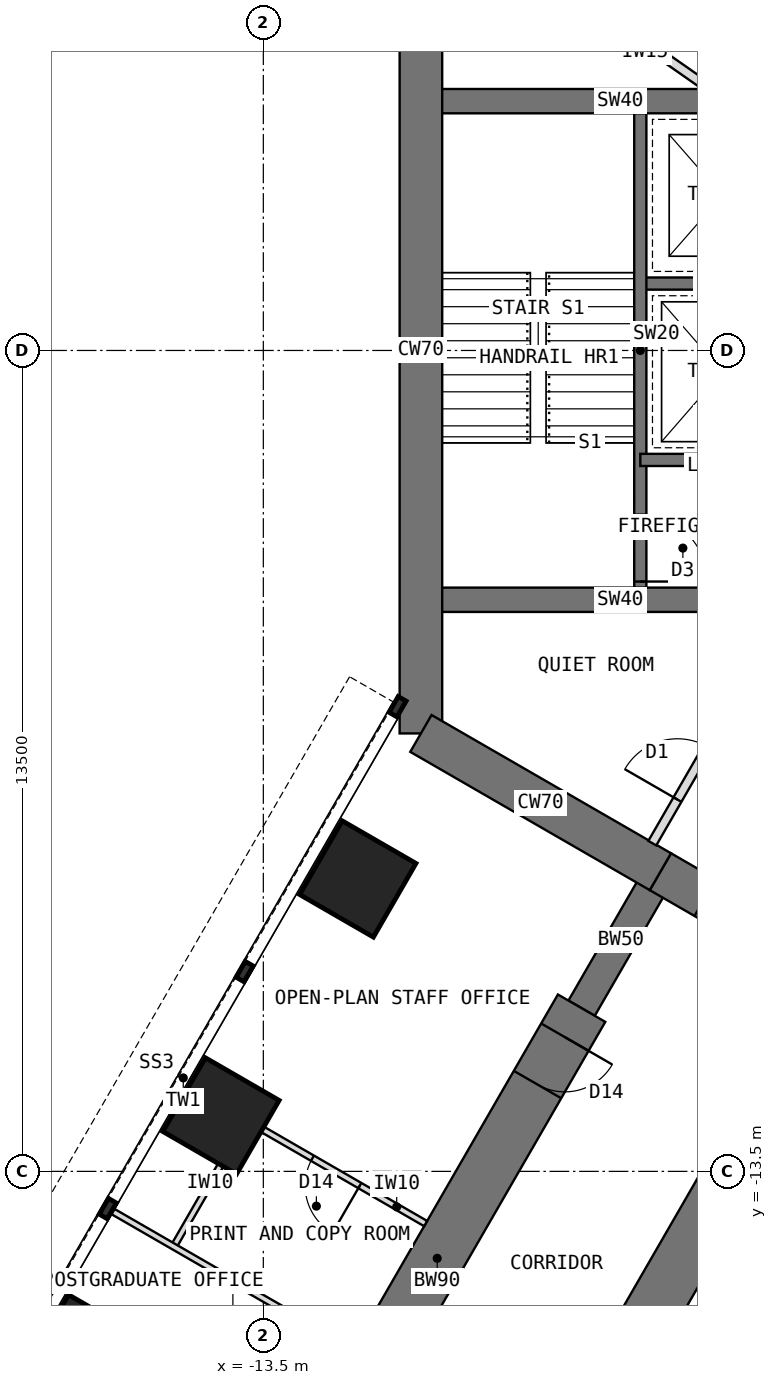
"""IFC4 building model, lengths in metres.
Left out: names, types, materials, properties, quantities, classifications, styles, units other than length and angle.
Written with IfcOpenShell. Run it as: python <this file> out.ifc"""

import sys

from ifc_helpers import new_model, si_unit, direction, frame, frame_2d, origin, origin_2d, place, context, subcontext, project, spatial, rectangle, extrude, element, fill, save


model = new_model("IFC4")
c1 = context("Model", 3, precision=1e-05, world=origin(), true_north=direction((0.0, 1.0)))
c2 = subcontext(c1, "Body", "Model", "MODEL_VIEW")
j1 = project(units=[si_unit("LENGTHUNIT", "METRE"), si_unit("PLANEANGLEUNIT", "RADIAN")], contexts=[c1])
p1 = place(None, origin())
s1 = spatial("IfcSite", under=j1, at=p1, CompositionType="ELEMENT")
p2 = place(p1, origin())
s2 = spatial("IfcBuilding", under=s1, at=p2, CompositionType="ELEMENT")
p3 = place(p2, frame((0.0, 0.0, 84.5)))
s3 = spatial("IfcBuildingStorey", under=s2, at=p3, CompositionType="ELEMENT", Elevation=84.5)
p4 = place(p3, frame((-10.908, 6.298, 0.0), z_axis=(0.0, 0.0, 1.0), x_axis=(0.0, -1.0, 0.0)))
e1 = element("IfcWall", 1, at=p4, inside=s3, PredefinedType="SHEAR", context=c2, shape_type="SweptSolid", body=[
    extrude(rectangle(XDim=12.596, YDim=0.7, at=frame_2d((6.298, 0.0))), origin(), (0.0, 0.0, 1.0), 4.0),
])
p5 = place(p3, frame((-10.908, -6.298, 0.0), z_axis=(0.0, 0.0, 1.0), x_axis=(0.866034513004, -0.499984222037, 0.0)))
e2 = element("IfcWall", 2, at=p5, inside=s3, PredefinedType="SHEAR", context=c2, shape_type="SweptSolid", body=[
    extrude(rectangle(XDim=4.548, YDim=0.7, at=frame_2d((2.274, 0.0))), origin(), (0.0, 0.0, 1.0), 4.0),
])
p6 = place(p3, frame((-6.97, -8.572, 0.0), z_axis=(0.0, 0.0, 1.0), x_axis=(0.866019471182, -0.500010275428, 0.0)))
e3 = element("IfcWall", 3, at=p6, inside=s3, PredefinedType="SHEAR", context=c2, shape_type="SweptSolid", body=[
    extrude(rectangle(XDim=3.5, YDim=0.7, at=frame_2d((1.75, 0.0))), origin(), (0.0, 0.0, 1.0), 4.0),
])
p7 = place(p6, frame((0.85, 0.0, 0.0)))
e4 = element("IfcOpeningElement", 4, at=p7, cuts=e3, PredefinedType="OPENING", context=c2, shape_type="SweptSolid", body=[
    extrude(rectangle(XDim=1.8, YDim=2.1, at=frame_2d((0.9, 1.05))), frame((0.0, 0.36, 0.0), z_axis=(0.0, -1.0, 0.0), x_axis=(1.0, 0.0, 0.0)), (0.0, 0.0, 1.0), 0.72),
])
p8 = place(p3, frame((-5.234, -12.566, 0.0), z_axis=(0.0, 0.0, 1.0), x_axis=(-0.499997557548, -0.86602681393, 0.0)))
e5 = element("IfcWall", 5, at=p8, inside=s3, PredefinedType="SHEAR", context=c2, shape_type="SweptSolid", body=[
    extrude(rectangle(XDim=9.5, YDim=0.9, at=frame_2d((4.75, 0.0))), origin(), (0.0, 0.0, 1.0), 4.0),
])
p9 = place(p8, frame((0.55, 0.0, 0.0)))
e6 = element("IfcOpeningElement", 6, at=p9, cuts=e5, PredefinedType="OPENING", context=c2, shape_type="SweptSolid", body=[
    extrude(rectangle(XDim=0.9, YDim=2.1, at=frame_2d((0.45, 1.05))), frame((0.0, 0.46, 0.0), z_axis=(0.0, -1.0, 0.0), x_axis=(1.0, 0.0, 0.0)), (0.0, 0.0, 1.0), 0.92),
])
p10 = place(p8, frame((7.3, 0.0, 0.0)))
e7 = element("IfcOpeningElement", 7, at=p10, cuts=e5, PredefinedType="OPENING", context=c2, shape_type="SweptSolid", body=[
    extrude(rectangle(XDim=0.9, YDim=2.1, at=frame_2d((0.45, 1.05))), frame((0.0, 0.46, 0.0), z_axis=(0.0, -1.0, 0.0), x_axis=(1.0, 0.0, 0.0)), (0.0, 0.0, 1.0), 0.92),
])
p11 = place(p3, frame((-6.97, -8.572, 0.0), z_axis=(0.0, 0.0, 1.0), x_axis=(-0.499988811324, -0.866031863473, 0.0)))
e8 = element("IfcWall", 8, at=p11, inside=s3, PredefinedType="SHEAR", context=c2, shape_type="SweptSolid", body=[
    extrude(rectangle(XDim=2.592, YDim=0.5, at=frame_2d((1.296, 0.0))), origin(), (0.0, 0.0, 1.0), 4.0),
])
p12 = place(p3, frame((-8.266, -10.816, 0.0), z_axis=(0.0, 0.0, 1.0), x_axis=(-0.499997557548, -0.86602681393, 0.0)))
e9 = element("IfcWall", 9, at=p12, inside=s3, PredefinedType="SHEAR", context=c2, shape_type="SweptSolid", body=[
    extrude(rectangle(XDim=9.5, YDim=0.9, at=frame_2d((4.75, 0.0))), origin(), (0.0, 0.0, 1.0), 4.0),
])
p13 = place(p12, frame((0.55, 0.0, 0.0)))
e10 = element("IfcOpeningElement", 10, at=p13, cuts=e9, PredefinedType="OPENING", context=c2, shape_type="SweptSolid", body=[
    extrude(rectangle(XDim=0.9, YDim=2.1, at=frame_2d((0.45, 1.05))), frame((0.0, 0.46, 0.0), z_axis=(0.0, -1.0, 0.0), x_axis=(1.0, 0.0, 0.0)), (0.0, 0.0, 1.0), 0.92),
])
p14 = place(p12, frame((7.3, 0.0, 0.0)))
e11 = element("IfcOpeningElement", 11, at=p14, cuts=e9, PredefinedType="OPENING", context=c2, shape_type="SweptSolid", body=[
    extrude(rectangle(XDim=0.9, YDim=2.1, at=frame_2d((0.45, 1.05))), frame((0.0, 0.46, 0.0), z_axis=(0.0, -1.0, 0.0), x_axis=(1.0, 0.0, 0.0)), (0.0, 0.0, 1.0), 0.92),
])
for number, where, z_axis, x_axis in (
    (12, (-11.946, -8.691, 0.0), (0.0, 0.0, 1.0), (0.5, 0.866, 0.0)),
    (13, (-14.196, -12.588, 0.0), (0.0, 0.0, 1.0), (0.5, 0.866, 0.0)),
    (14, (-16.446, -16.486, 0.0), (0.0, 0.0, 1.0), (0.5, 0.866, 0.0)),
):
    element("IfcColumn", number, at=place(p3, frame(where, z_axis=z_axis, x_axis=x_axis)), inside=s3, PredefinedType="COLUMN", context=c2, shape_type="SweptSolid", body=[
        extrude(rectangle(XDim=1.4, YDim=1.4, at=origin_2d()), origin(), (0.0, 0.0, 1.0), 4.0),
    ])
p15 = place(p3, frame((-4.7, 1.1, 0.0), z_axis=(0.0, 0.0, 1.0), x_axis=(-1.0, 0.0, 0.0)))
e15 = element("IfcWall", 15, at=p15, inside=s3, PredefinedType="SHEAR", context=c2, shape_type="SweptSolid", body=[
    extrude(rectangle(XDim=2.6, YDim=0.2, at=frame_2d((1.3, 0.0))), origin(), (0.0, 0.0, 1.0), 4.0),
])
p16 = place(p3, frame((-4.7, -1.8, 0.0), z_axis=(0.0, 0.0, 1.0), x_axis=(-1.0, 0.0, 0.0)))
e16 = element("IfcWall", 16, at=p16, inside=s3, PredefinedType="SHEAR", context=c2, shape_type="SweptSolid", body=[
    extrude(rectangle(XDim=2.6, YDim=0.2, at=frame_2d((1.3, 0.0))), origin(), (0.0, 0.0, 1.0), 4.0),
])
p17 = place(p16, frame((0.55, 0.0, 0.0)))
e17 = element("IfcOpeningElement", 17, at=p17, cuts=e16, PredefinedType="OPENING", context=c2, shape_type="SweptSolid", body=[
    extrude(rectangle(XDim=1.3, YDim=2.2, at=frame_2d((0.65, 1.1))), frame((0.0, 0.11, 0.0), z_axis=(0.0, -1.0, 0.0), x_axis=(1.0, 0.0, 0.0)), (0.0, 0.0, 1.0), 0.22),
])
p18 = place(p3, frame((-7.3, 4.0, 0.0), z_axis=(0.0, 0.0, 1.0), x_axis=(0.0, -1.0, 0.0)))
e18 = element("IfcWall", 18, at=p18, inside=s3, PredefinedType="SHEAR", context=c2, shape_type="SweptSolid", body=[
    extrude(rectangle(XDim=8.0, YDim=0.2, at=frame_2d((4.0, 0.0))), origin(), (0.0, 0.0, 1.0), 4.0),
])
p19 = place(p18, frame((6.7, 0.0, 0.0)))
e19 = element("IfcOpeningElement", 19, at=p19, cuts=e18, PredefinedType="OPENING", context=c2, shape_type="SweptSolid", body=[
    extrude(rectangle(XDim=1.1, YDim=2.1, at=frame_2d((0.55, 1.05))), frame((0.0, 0.11, 0.0), z_axis=(0.0, -1.0, 0.0), x_axis=(1.0, 0.0, 0.0)), (0.0, 0.0, 1.0), 0.22),
])
for number, where, z_axis, x_axis in (
    (20, (-4.7, -4.1, 0.0), (0.0, 0.0, 1.0), (-1.0, 0.0, 0.0)),
    (21, (-4.7, 4.1, 0.0), (0.0, 0.0, 1.0), (-1.0, 0.0, 0.0)),
):
    element("IfcWall", number, at=place(p3, frame(where, z_axis=z_axis, x_axis=x_axis)), inside=s3, PredefinedType="SHEAR", context=c2, shape_type="SweptSolid", body=[
        extrude(rectangle(XDim=5.858, YDim=0.4, at=frame_2d((2.929, 0.0))), origin(), (0.0, 0.0, 1.0), 4.0),
    ])
p20 = place(p3, frame((-12.03, -16.437, 0.0), z_axis=(0.0, 0.0, 1.0), x_axis=(-0.866035472144, 0.499982560684, 0.0)))
e22 = element("IfcWall", 22, at=p20, inside=s3, PredefinedType="PARTITIONING", context=c2, shape_type="SweptSolid", body=[
    extrude(rectangle(XDim=4.55, YDim=0.1, at=frame_2d((2.275, 0.0))), origin(), (0.0, 0.0, 1.0), 3.8),
])
p21 = place(p3, frame((-13.775, -12.658, 0.0), z_axis=(0.0, 0.0, 1.0), x_axis=(-0.500033551112, -0.866006032174, 0.0)))
e23 = element("IfcWall", 23, at=p21, inside=s3, PredefinedType="PARTITIONING", context=c2, shape_type="SweptSolid", body=[
    extrude(rectangle(XDim=2.4, YDim=0.1, at=frame_2d((1.2, 0.0))), origin(), (0.0, 0.0, 1.0), 3.8),
])
p22 = place(p3, frame((-10.83, -14.359, 0.0), z_axis=(0.0, 0.0, 1.0), x_axis=(-0.865989465428, 0.500062241894, 0.0)))
e24 = element("IfcWall", 24, at=p22, inside=s3, PredefinedType="PARTITIONING", context=c2, shape_type="SweptSolid", body=[
    extrude(rectangle(XDim=3.4, YDim=0.1, at=frame_2d((1.7, 0.0))), origin(), (0.0, 0.0, 1.0), 3.8),
])
p23 = place(p22, frame((1.25, 0.0, 0.0)))
e25 = element("IfcOpeningElement", 25, at=p23, cuts=e24, PredefinedType="OPENING", context=c2, shape_type="SweptSolid", body=[
    extrude(rectangle(XDim=0.9, YDim=2.1, at=frame_2d((0.45, 1.05))), frame((0.0, 0.06, 0.0), z_axis=(0.0, -1.0, 0.0), x_axis=(1.0, 0.0, 0.0)), (0.0, 0.0, 1.0), 0.12),
])
p24 = place(p3, frame((-7.103, -8.103, 0.0), z_axis=(0.0, 0.0, 1.0), x_axis=(0.500007369519, 0.866021148949, 0.0)))
e26 = element("IfcWall", 26, at=p24, inside=s3, PredefinedType="PARTITIONING", context=c2, shape_type="SweptSolid", body=[
    extrude(rectangle(XDim=4.426, YDim=0.15, at=frame_2d((2.213, 0.0))), origin(), (0.0, 0.0, 1.0), 3.8),
])
p25 = place(p24, frame((0.828, 0.0, 0.0)))
e27 = element("IfcOpeningElement", 27, at=p25, cuts=e26, PredefinedType="OPENING", context=c2, shape_type="SweptSolid", body=[
    extrude(rectangle(XDim=1.0, YDim=2.1, at=frame_2d((0.5, 1.05))), frame((0.0, 0.085, 0.0), z_axis=(0.0, -1.0, 0.0), x_axis=(1.0, 0.0, 0.0)), (0.0, 0.0, 1.0), 0.17),
])
p26 = place(p3, frame((-4.89, 4.27, 0.0), z_axis=(0.0, 0.0, 1.0), x_axis=(-0.500007369519, 0.866021148949, 0.0)))
e28 = element("IfcWall", 28, at=p26, inside=s3, PredefinedType="PARTITIONING", context=c2, shape_type="SweptSolid", body=[
    extrude(rectangle(XDim=4.426, YDim=0.15, at=frame_2d((2.213, 0.0))), origin(), (0.0, 0.0, 1.0), 3.8),
])
p27 = place(p26, frame((0.828, 0.0, 0.0)))
e29 = element("IfcOpeningElement", 29, at=p27, cuts=e28, PredefinedType="OPENING", context=c2, shape_type="SweptSolid", body=[
    extrude(rectangle(XDim=1.0, YDim=2.1, at=frame_2d((0.5, 1.05))), frame((0.0, 0.085, 0.0), z_axis=(0.0, -1.0, 0.0), x_axis=(1.0, 0.0, 0.0)), (0.0, 0.0, 1.0), 0.17),
])
p28 = place(p3, frame((-5.865, 4.1, 0.0), z_axis=(0.0, 0.0, 1.0), x_axis=(-0.819614241928, 0.572915783016, 0.0)))
e30 = element("IfcWall", 30, at=p28, inside=s3, PredefinedType="PARTITIONING", context=c2, shape_type="SweptSolid", body=[
    extrude(rectangle(XDim=4.498, YDim=0.15, at=frame_2d((2.249, 0.0))), origin(), (0.0, 0.0, 1.0), 3.8),
])
p29 = place(p28, frame((2.648, 0.0, 0.0)))
e31 = element("IfcOpeningElement", 31, at=p29, cuts=e30, PredefinedType="OPENING", context=c2, shape_type="SweptSolid", body=[
    extrude(rectangle(XDim=1.0, YDim=2.1, at=frame_2d((0.5, 1.05))), frame((0.0, 0.085, 0.0), z_axis=(0.0, -1.0, 0.0), x_axis=(1.0, 0.0, 0.0)), (0.0, 0.0, 1.0), 0.17),
])
p30 = place(p17, origin())
e32 = element("IfcDoor", 32, at=p30, inside=s3, OperationType="DOUBLE_DOOR_SLIDING", PredefinedType="DOOR", context=c2, shape_type="SweptSolid", body=[
    extrude(rectangle(XDim=1.3, YDim=2.2, at=frame_2d((0.65, 1.1))), frame((0.0, 0.025, 0.0), z_axis=(0.0, -1.0, 0.0), x_axis=(1.0, 0.0, 0.0)), (0.0, 0.0, 1.0), 0.05),
])
fill(e17, e32)
p31 = place(p19, origin())
e33 = element("IfcDoor", 33, at=p31, inside=s3, OperationType="SINGLE_SWING_RIGHT", PredefinedType="DOOR", context=c2, shape_type="SweptSolid", body=[
    extrude(rectangle(XDim=1.1, YDim=2.1, at=frame_2d((0.55, 1.05))), frame((0.0, 0.025, 0.0), z_axis=(0.0, -1.0, 0.0), x_axis=(1.0, 0.0, 0.0)), (0.0, 0.0, 1.0), 0.05),
])
fill(e19, e33)
p32 = place(p7, origin())
e34 = element("IfcDoor", 34, at=p32, inside=s3, OperationType="DOUBLE_DOOR_DOUBLE_SWING", PredefinedType="DOOR", context=c2, shape_type="SweptSolid", body=[
    extrude(rectangle(XDim=1.72, YDim=2.06, at=frame_2d((0.9, 1.03))), frame((0.0, 0.025, 0.0), z_axis=(0.0, -1.0, 0.0), x_axis=(1.0, 0.0, 0.0)), (0.0, 0.0, 1.0), 0.05),
    extrude(rectangle(XDim=0.04, YDim=2.1, at=frame_2d((0.02, 1.05))), frame((0.0, 0.35, 0.0), z_axis=(0.0, -1.0, 0.0), x_axis=(1.0, 0.0, 0.0)), (0.0, 0.0, 1.0), 0.699),
    extrude(rectangle(XDim=0.04, YDim=2.1, at=frame_2d((1.78, 1.05))), frame((0.0, 0.35, 0.0), z_axis=(0.0, -1.0, 0.0), x_axis=(1.0, 0.0, 0.0)), (0.0, 0.0, 1.0), 0.699),
    extrude(rectangle(XDim=1.72, YDim=0.04, at=frame_2d((0.9, 2.08))), frame((0.0, 0.35, 0.0), z_axis=(0.0, -1.0, 0.0), x_axis=(1.0, 0.0, 0.0)), (0.0, 0.0, 1.0), 0.699),
])
fill(e4, e34)
p33 = place(p23, origin())
e35 = element("IfcDoor", 35, at=p33, inside=s3, OperationType="SINGLE_SWING_LEFT", PredefinedType="DOOR", context=c2, shape_type="SweptSolid", body=[
    extrude(rectangle(XDim=0.9, YDim=2.1, at=frame_2d((0.45, 1.05))), frame((0.0, 0.025, 0.0), z_axis=(0.0, -1.0, 0.0), x_axis=(1.0, 0.0, 0.0)), (0.0, 0.0, 1.0), 0.05),
])
fill(e25, e35)
p34 = place(p25, origin())
e36 = element("IfcDoor", 36, at=p34, inside=s3, OperationType="SINGLE_SWING_LEFT", PredefinedType="DOOR", context=c2, shape_type="SweptSolid", body=[
    extrude(rectangle(XDim=1.0, YDim=2.1, at=frame_2d((0.5, 1.05))), frame((0.0, 0.025, 0.0), z_axis=(0.0, -1.0, 0.0), x_axis=(1.0, 0.0, 0.0)), (0.0, 0.0, 1.0), 0.05),
])
fill(e27, e36)
p35 = place(p13, origin())
e37 = element("IfcDoor", 37, at=p35, inside=s3, OperationType="SINGLE_SWING_LEFT", PredefinedType="DOOR", context=c2, shape_type="SweptSolid", body=[
    extrude(rectangle(XDim=0.82, YDim=2.06, at=frame_2d((0.45, 1.03))), frame((0.0, 0.025, 0.0), z_axis=(0.0, -1.0, 0.0), x_axis=(1.0, 0.0, 0.0)), (0.0, 0.0, 1.0), 0.05),
    extrude(rectangle(XDim=0.04, YDim=2.1, at=frame_2d((0.02, 1.05))), frame((0.0, 0.45, 0.0), z_axis=(0.0, -1.0, 0.0), x_axis=(1.0, 0.0, 0.0)), (0.0, 0.0, 1.0), 0.899),
    extrude(rectangle(XDim=0.04, YDim=2.1, at=frame_2d((0.88, 1.05))), frame((0.0, 0.45, 0.0), z_axis=(0.0, -1.0, 0.0), x_axis=(1.0, 0.0, 0.0)), (0.0, 0.0, 1.0), 0.899),
    extrude(rectangle(XDim=0.82, YDim=0.04, at=frame_2d((0.45, 2.08))), frame((0.0, 0.45, 0.0), z_axis=(0.0, -1.0, 0.0), x_axis=(1.0, 0.0, 0.0)), (0.0, 0.0, 1.0), 0.899),
])
fill(e10, e37)
save(model, sys.argv[1])
